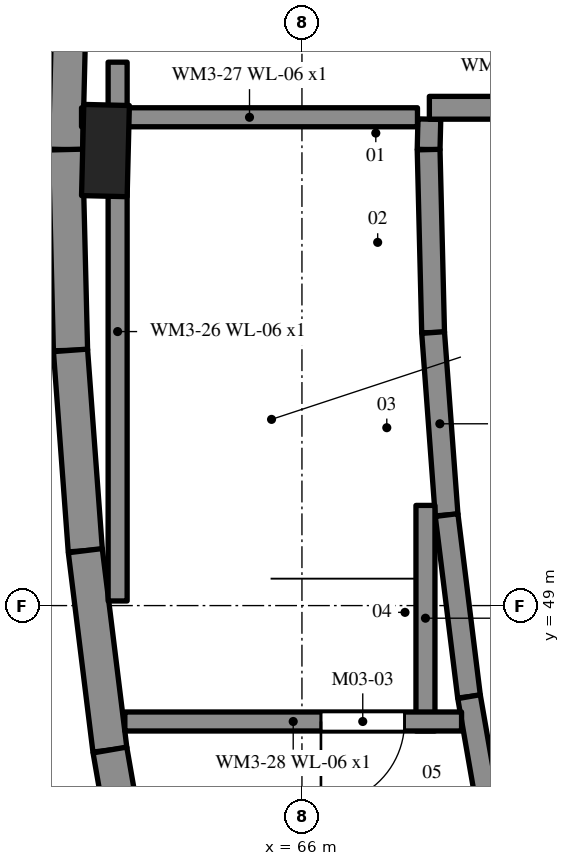
"""IFC4 building model, lengths in metres.
Left out: names, types, materials, properties, quantities, classifications, styles, units other than length and angle.
Written with IfcOpenShell. Run it as: python <this file> out.ifc"""

import sys

from ifc_helpers import new_model, si_unit, direction, frame, frame_2d, origin, origin_2d, place, context, subcontext, project, spatial, polyline, rectangle, outline, extrude, element, fill, save


model = new_model("IFC4")
c1 = context("Model", 3, precision=1e-05, world=origin(), true_north=direction((0.0, 1.0)))
c2 = subcontext(c1, "Body", "Model", "MODEL_VIEW")
j1 = project(units=[si_unit("LENGTHUNIT", "METRE"), si_unit("PLANEANGLEUNIT", "RADIAN")], contexts=[c1])
p1 = place(None, origin())
s1 = spatial("IfcSite", under=j1, at=p1, CompositionType="ELEMENT")
p2 = place(p1, origin())
s2 = spatial("IfcBuilding", under=s1, at=p2, CompositionType="ELEMENT")
p3 = place(p2, frame((0.0, 0.0, 14.8)))
s3 = spatial("IfcBuildingStorey", under=s2, at=p3, CompositionType="ELEMENT", Elevation=14.8)
p4 = place(p3, frame((62.955, 57.642, 0.0), z_axis=(0.0, 0.0, 1.0), x_axis=(-0.024666736886, -0.999695729756, 0.0)))
e1 = element("IfcWall", 1, at=p4, inside=s3, PredefinedType="SOLIDWALL", context=c2, shape_type="SweptSolid", body=[
    extrude(outline(polyline([(0.0, 0.0), (2.643, 0.0), (2.643, 3.874), (2.573, 3.85), (0.0, 2.974), (0.0, 0.0)])), frame((0.0, 0.225, 0.0), z_axis=(0.0, -1.0, 0.0), x_axis=(1.0, 0.0, 0.0)), (0.0, 0.0, 1.0), 0.45),
])
p5 = place(p3, frame((62.89, 55.0, 0.0), z_axis=(0.0, 0.0, 1.0), x_axis=(0.024666736886, -0.999695729756, 0.0)))
e2 = element("IfcWall", 2, at=p5, inside=s3, PredefinedType="SOLIDWALL", context=c2, shape_type="SweptSolid", body=[
    extrude(outline(polyline([(0.0, 0.0), (2.643, 0.0), (2.643, 2.974), (2.62, 2.981), (0.059, 3.854), (0.0, 3.874), (0.0, 0.0)])), frame((0.0, 0.225, 0.0), z_axis=(0.0, -1.0, 0.0), x_axis=(1.0, 0.0, 0.0)), (0.0, 0.0, 1.0), 0.45),
])
p6 = place(p3, frame((62.955, 52.358, 0.0), z_axis=(0.0, 0.0, 1.0), x_axis=(0.07363685767, -0.997285121313, 0.0)))
e3 = element("IfcWall", 3, at=p6, inside=s3, PredefinedType="SOLIDWALL", context=c2, shape_type="SweptSolid", body=[
    extrude(outline(polyline([(0.0, 0.0), (2.642, 0.0), (2.643, 2.093), (2.603, 2.083), (0.0, 2.97), (0.0, 0.0)])), frame((0.0, 0.225, 0.0), z_axis=(0.0, -1.0, 0.0), x_axis=(1.0, 0.0, 0.0)), (0.0, 0.0, 1.0), 0.45),
])
p7 = place(p3, frame((63.15, 49.723, 0.0), z_axis=(0.0, 0.0, 1.0), x_axis=(0.122499610212, -0.992468561466, 0.0)))
e4 = element("IfcWall", 4, at=p7, inside=s3, PredefinedType="SOLIDWALL", context=c2, shape_type="SweptSolid", body=[
    extrude(outline(polyline([(0.0, 0.0), (2.643, 0.0), (2.643, 2.996), (2.585, 2.978), (0.087, 2.126), (0.0, 2.096), (0.0, 0.0)])), frame((0.0, 0.225, 0.0), z_axis=(0.0, -1.0, 0.0), x_axis=(1.0, 0.0, 0.0)), (0.0, 0.0, 1.0), 0.45),
])
p8 = place(p3, frame((63.473, 47.1, 0.0), z_axis=(0.0, 0.0, 1.0), x_axis=(0.171196910379, -0.985236833394, 0.0)))
e5 = element("IfcWall", 5, at=p8, inside=s3, PredefinedType="SOLIDWALL", context=c2, shape_type="SweptSolid", body=[
    extrude(outline(polyline([(0.0, 0.0), (2.643, 0.0), (2.643, 3.864), (2.603, 3.886), (2.525, 3.86), (0.069, 3.023), (0.0, 3.0), (0.0, 0.0)])), frame((0.0, 0.225, 0.0), z_axis=(0.0, -1.0, 0.0), x_axis=(1.0, 0.0, 0.0)), (0.0, 0.0, 1.0), 0.45),
])
p9 = place(p3, frame((67.676, 55.4, 0.0), z_axis=(0.0, 0.0, 1.0), x_axis=(-0.024412746386, -0.999701964494, 0.0)))
e6 = element("IfcWall", 6, at=p9, inside=s3, PredefinedType="SHEAR", context=c2, shape_type="SweptSolid", body=[
    extrude(outline(polyline([(0.0, 0.0), (0.4, 0.0), (0.4, 5.943), (0.332, 5.919), (0.0, 5.806), (0.0, 0.0)])), frame((0.0, 0.15, 0.0), z_axis=(0.0, -1.0, 0.0), x_axis=(1.0, 0.0, 0.0)), (0.0, 0.0, 1.0), 0.3),
])
p10 = place(p3, frame((67.667, 55.0, 0.0), z_axis=(0.0, 0.0, 1.0), x_axis=(0.024536221488, -0.999698941599, 0.0)))
e7 = element("IfcWall", 7, at=p10, inside=s3, PredefinedType="SHEAR", context=c2, shape_type="SweptSolid", body=[
    extrude(outline(polyline([(0.0, 0.0), (2.408, 0.0), (2.408, 5.114), (2.03, 5.251), (0.061, 5.922), (0.0, 5.943), (0.0, 0.0)])), frame((0.0, 0.15, 0.0), z_axis=(0.0, -1.0, 0.0), x_axis=(1.0, 0.0, 0.0)), (0.0, 0.0, 1.0), 0.3),
])
p11 = place(p3, frame((67.726, 52.593, 0.0), z_axis=(0.0, 0.0, 1.0), x_axis=(0.073711091533, -0.997279637306, 0.0)))
e8 = element("IfcWall", 8, at=p11, inside=s3, PredefinedType="SHEAR", context=c2, shape_type="SweptSolid", body=[
    extrude(outline(polyline([(0.0, 0.0), (2.408, 0.0), (2.408, 4.494), (1.711, 4.529), (1.659, 4.546), (0.0, 5.111), (0.0, 0.0)])), frame((0.0, 0.15, 0.0), z_axis=(0.0, -1.0, 0.0), x_axis=(1.0, 0.0, 0.0)), (0.0, 0.0, 1.0), 0.3),
])
p12 = place(p3, frame((67.903, 50.191, 0.0), z_axis=(0.0, 0.0, 1.0), x_axis=(0.122487115362, -0.992470103615, 0.0)))
e9 = element("IfcWall", 9, at=p12, inside=s3, PredefinedType="SHEAR", context=c2, shape_type="SweptSolid", body=[
    extrude(outline(polyline([(0.0, 0.0), (2.408, 0.0), (2.408, 4.689), (1.784, 4.477), (1.726, 4.458), (1.668, 4.437), (0.0, 4.493), (0.0, 0.0)])), frame((0.0, 0.15, 0.0), z_axis=(0.0, -1.0, 0.0), x_axis=(1.0, 0.0, 0.0)), (0.0, 0.0, 1.0), 0.3),
])
p13 = place(p3, frame((68.198, 47.802, 0.0), z_axis=(0.0, 0.0, 1.0), x_axis=(0.171225522804, -0.985231861209, 0.0)))
e10 = element("IfcWall", 10, at=p13, inside=s3, PredefinedType="SHEAR", context=c2, shape_type="SweptSolid", body=[
    extrude(outline(polyline([(0.0, 0.0), (2.406, 0.0), (2.405, 5.534), (1.396, 5.191), (1.304, 5.159), (0.0, 4.692), (0.0, 0.0)])), frame((0.0, 0.15, 0.0), z_axis=(0.0, -1.0, 0.0), x_axis=(1.0, 0.0, 0.0)), (0.0, 0.0, 1.0), 0.3),
])
p14 = place(p3, frame((67.676, 55.55, 0.0), z_axis=(0.0, 0.0, 1.0), x_axis=(1.0, 0.0, 0.0)))
e11 = element("IfcWall", 11, at=p14, inside=s3, PredefinedType="SHEAR", context=c2, shape_type="SweptSolid", body=[
    extrude(outline(polyline([(0.0, 0.0), (2.874, 0.0), (2.874, 6.991), (0.0, 5.766), (0.0, 0.0)])), frame((0.0, 0.15, 0.0), z_axis=(0.0, -1.0, 0.0), x_axis=(1.0, 0.0, 0.0)), (0.0, 0.0, 1.0), 0.3),
])
p15 = place(p3, frame((63.415, 54.987, 0.0), z_axis=(0.0, 0.0, 1.0), x_axis=(-0.024571762574, -0.999698068661, 0.0)))
e12 = element("IfcColumn", 12, at=p15, inside=s3, PredefinedType="PILASTER", context=c2, shape_type="SweptSolid", body=[
    extrude(rectangle(XDim=1.2, YDim=0.6, at=origin_2d()), origin(), (0.0, 0.0, 1.0), 3.072),
])
p16 = place(p3, frame((67.625, 47.35, 0.0), z_axis=(0.0, 0.0, 1.0), x_axis=(0.0, 1.0, 0.0)))
e13 = element("IfcWall", 13, at=p16, inside=s3, PredefinedType="SHEAR", context=c2, shape_type="SweptSolid", body=[
    extrude(rectangle(XDim=2.968, YDim=0.25, at=frame_2d((1.484, 0.0))), origin(), (0.0, 0.0, 1.0), 2.232),
])
p17 = place(p3, frame((63.575, 56.15, 0.0), z_axis=(0.0, 0.0, 1.0), x_axis=(0.0, -1.0, 0.0)))
e14 = element("IfcWall", 14, at=p17, inside=s3, PredefinedType="SHEAR", context=c2, shape_type="SweptSolid", body=[
    extrude(rectangle(XDim=7.089, YDim=0.25, at=frame_2d((3.544, 0.0))), origin(), (0.0, 0.0, 1.0), 2.232),
])
p18 = place(p3, frame((63.1, 55.425, 0.0), z_axis=(0.0, 0.0, 1.0), x_axis=(1.0, 0.0, 0.0)))
e15 = element("IfcWall", 15, at=p18, inside=s3, PredefinedType="SHEAR", context=c2, shape_type="SweptSolid", body=[
    extrude(rectangle(XDim=4.42, YDim=0.25, at=frame_2d((2.21, 0.0))), origin(), (0.0, 0.0, 1.0), 2.232),
])
p19 = place(p3, frame((68.1, 47.475, 0.0), z_axis=(0.0, 0.0, 1.0), x_axis=(-1.0, 0.0, 0.0)))
e16 = element("IfcWall", 16, at=p19, inside=s3, PredefinedType="SHEAR", context=c2, shape_type="SweptSolid", body=[
    extrude(rectangle(XDim=4.43, YDim=0.25, at=frame_2d((2.215, 0.0))), origin(), (0.0, 0.0, 1.0), 2.232),
])
p20 = place(p19, frame((0.75, 0.0, 0.0)))
e17 = element("IfcOpeningElement", 17, at=p20, cuts=e16, PredefinedType="OPENING", context=c2, shape_type="SweptSolid", body=[
    extrude(rectangle(XDim=1.1, YDim=2.1, at=frame_2d((0.55, 1.05))), frame((0.0, 0.135, 0.0), z_axis=(0.0, -1.0, 0.0), x_axis=(1.0, 0.0, 0.0)), (0.0, 0.0, 1.0), 0.27),
])
p21 = place(p20, origin())
e18 = element("IfcDoor", 18, at=p21, inside=s3, OperationType="SINGLE_SWING_RIGHT", PredefinedType="DOOR", context=c2, shape_type="SweptSolid", body=[
    extrude(rectangle(XDim=1.1, YDim=2.1, at=frame_2d((0.55, 1.05))), frame((0.0, 0.025, 0.0), z_axis=(0.0, -1.0, 0.0), x_axis=(1.0, 0.0, 0.0)), (0.0, 0.0, 1.0), 0.05),
])
fill(e17, e18)
save(model, sys.argv[1])
